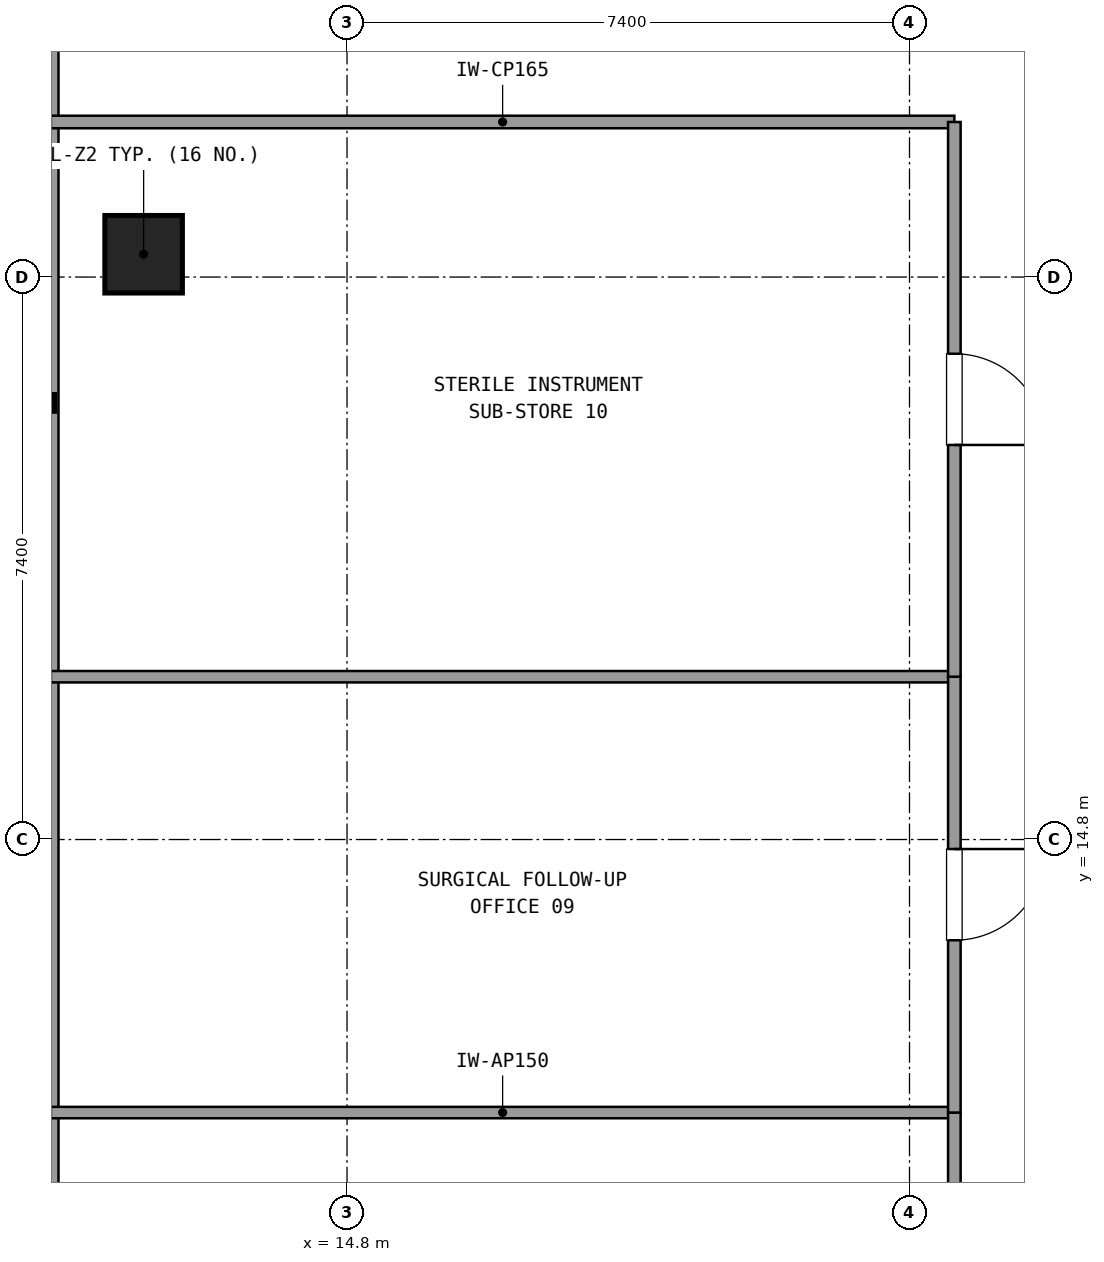
"""IFC4 building model, lengths in metres.
Left out: names, types, materials, properties, quantities, classifications, styles, units other than length and angle.
Written with IfcOpenShell. Run it as: python <this file> out.ifc"""

import sys

from ifc_helpers import new_model, si_unit, direction, frame, frame_2d, origin, origin_2d, place, context, subcontext, project, spatial, rectangle, extrude, element, fill, save


model = new_model("IFC4")
c1 = context("Model", 3, precision=1e-05, world=origin(), true_north=direction((0.0, 1.0)))
c2 = subcontext(c1, "Body", "Model", "MODEL_VIEW")
j1 = project(units=[si_unit("LENGTHUNIT", "METRE"), si_unit("PLANEANGLEUNIT", "RADIAN")], contexts=[c1])
p1 = place(None, origin())
s1 = spatial("IfcSite", under=j1, at=p1, CompositionType="ELEMENT")
p2 = place(p1, origin())
s2 = spatial("IfcBuilding", under=s1, at=p2, CompositionType="ELEMENT")
p3 = place(p2, frame((0.0, 0.0, 95.58)))
s3 = spatial("IfcBuildingStorey", under=s2, at=p3, CompositionType="ELEMENT", Elevation=95.58)
p4 = place(p3, frame((12.124, 22.5, 0.021), z_axis=(0.084850379912, 0.0, 0.996393703828), x_axis=(0.0, 1.0, 0.0)))
e1 = element("IfcColumn", 1, at=p4, inside=s3, PredefinedType="COLUMN", context=c2, shape_type="SweptSolid", body=[
    extrude(rectangle(XDim=1.02, YDim=1.02, at=origin_2d()), origin(), (0.0, 0.0, 1.0), 3.571),
])
p5 = place(p3, frame((10.884, 41.968, 0.0), z_axis=(0.0, 0.0, 1.0), x_axis=(0.0, -1.0, 0.0)))
e2 = element("IfcWall", 2, at=p5, inside=s3, PredefinedType="SOLIDWALL", context=c2, shape_type="SweptSolid", body=[
    extrude(rectangle(XDim=32.136, YDim=0.24, at=frame_2d((16.068, 0.0))), origin(), (0.0, 0.0, 1.0), 0.85),
])
p6 = place(p3, frame((10.904, 24.24, 0.0), z_axis=(0.0, 0.0, 1.0), x_axis=(1.0, 0.0, 0.0)))
e3 = element("IfcWall", 3, at=p6, inside=s3, PredefinedType="PARTITIONING", context=c2, shape_type="SweptSolid", body=[
    extrude(rectangle(XDim=11.886, YDim=0.165, at=frame_2d((5.943, 0.0))), origin(), (0.0, 0.0, 1.0), 2.61),
])
p7 = place(p3, frame((22.79, 11.208, 0.0), z_axis=(0.0, 0.0, 1.0), x_axis=(-1.0, 0.0, 0.0)))
e4 = element("IfcWall", 4, at=p7, inside=s3, PredefinedType="PARTITIONING", context=c2, shape_type="SweptSolid", body=[
    extrude(rectangle(XDim=11.886, YDim=0.15, at=frame_2d((5.943, 0.0))), origin(), (0.0, 0.0, 1.0), 2.61),
])
p8 = place(p3, frame((22.79, 3.877, 0.0), z_axis=(0.0, 0.0, 1.0), x_axis=(0.0, 1.0, 0.0)))
e5 = element("IfcWall", 5, at=p8, inside=s3, PredefinedType="PARTITIONING", context=c2, shape_type="SweptSolid", body=[
    extrude(rectangle(XDim=7.331, YDim=0.165, at=frame_2d((3.666, 0.0))), origin(), (0.0, 0.0, 1.0), 2.61),
])
p9 = place(p8, frame((3.066, 0.0, 0.0)))
e6 = element("IfcOpeningElement", 6, at=p9, cuts=e5, PredefinedType="OPENING", context=c2, shape_type="SweptSolid", body=[
    extrude(rectangle(XDim=1.2, YDim=2.15, at=frame_2d((0.6, 1.075))), frame((0.0, 0.093, 0.0), z_axis=(0.0, -1.0, 0.0), x_axis=(1.0, 0.0, 0.0)), (0.0, 0.0, 1.0), 0.185),
])
p10 = place(p3, frame((22.79, 16.942, 0.0), z_axis=(0.0, 0.0, 1.0), x_axis=(-1.0, 0.0, 0.0)))
e7 = element("IfcWall", 7, at=p10, inside=s3, PredefinedType="PARTITIONING", context=c2, shape_type="SweptSolid", body=[
    extrude(rectangle(XDim=11.886, YDim=0.15, at=frame_2d((5.943, 0.0))), origin(), (0.0, 0.0, 1.0), 2.61),
])
p11 = place(p3, frame((22.79, 11.208, 0.0), z_axis=(0.0, 0.0, 1.0), x_axis=(0.0, 1.0, 0.0)))
e8 = element("IfcWall", 8, at=p11, inside=s3, PredefinedType="PARTITIONING", context=c2, shape_type="SweptSolid", body=[
    extrude(rectangle(XDim=5.734, YDim=0.165, at=frame_2d((2.867, 0.0))), origin(), (0.0, 0.0, 1.0), 2.61),
])
p12 = place(p11, frame((2.267, 0.0, 0.0)))
e9 = element("IfcOpeningElement", 9, at=p12, cuts=e8, PredefinedType="OPENING", context=c2, shape_type="SweptSolid", body=[
    extrude(rectangle(XDim=1.2, YDim=2.15, at=frame_2d((0.6, 1.075))), frame((0.0, 0.093, 0.0), z_axis=(0.0, -1.0, 0.0), x_axis=(1.0, 0.0, 0.0)), (0.0, 0.0, 1.0), 0.185),
])
p13 = place(p3, frame((22.79, 16.942, 0.0), z_axis=(0.0, 0.0, 1.0), x_axis=(0.0, 1.0, 0.0)))
e10 = element("IfcWall", 10, at=p13, inside=s3, PredefinedType="PARTITIONING", context=c2, shape_type="SweptSolid", body=[
    extrude(rectangle(XDim=7.298, YDim=0.165, at=frame_2d((3.649, 0.0))), origin(), (0.0, 0.0, 1.0), 2.61),
])
p14 = place(p13, frame((3.049, 0.0, 0.0)))
e11 = element("IfcOpeningElement", 11, at=p14, cuts=e10, PredefinedType="OPENING", context=c2, shape_type="SweptSolid", body=[
    extrude(rectangle(XDim=1.2, YDim=2.15, at=frame_2d((0.6, 1.075))), frame((0.0, 0.093, 0.0), z_axis=(0.0, -1.0, 0.0), x_axis=(1.0, 0.0, 0.0)), (0.0, 0.0, 1.0), 0.185),
])
p15 = place(p12, frame((1.2, 0.0, 0.0), z_axis=(0.0, 0.0, 1.0), x_axis=(-1.0, 0.0, 0.0)))
e12 = element("IfcDoor", 12, at=p15, inside=s3, OperationType="SINGLE_SWING_RIGHT", PredefinedType="DOOR", context=c2, shape_type="SweptSolid", body=[
    extrude(rectangle(XDim=1.2, YDim=2.15, at=frame_2d((0.6, 1.075))), frame((0.0, 0.025, 0.0), z_axis=(0.0, -1.0, 0.0), x_axis=(1.0, 0.0, 0.0)), (0.0, 0.0, 1.0), 0.05),
])
fill(e9, e12)
p16 = place(p14, frame((1.2, 0.0, 0.0), z_axis=(0.0, 0.0, 1.0), x_axis=(-1.0, 0.0, 0.0)))
e13 = element("IfcDoor", 13, at=p16, inside=s3, OperationType="SINGLE_SWING_LEFT", PredefinedType="DOOR", context=c2, shape_type="SweptSolid", body=[
    extrude(rectangle(XDim=1.2, YDim=2.15, at=frame_2d((0.6, 1.075))), frame((0.0, 0.025, 0.0), z_axis=(0.0, -1.0, 0.0), x_axis=(1.0, 0.0, 0.0)), (0.0, 0.0, 1.0), 0.05),
])
fill(e11, e13)
save(model, sys.argv[1])
